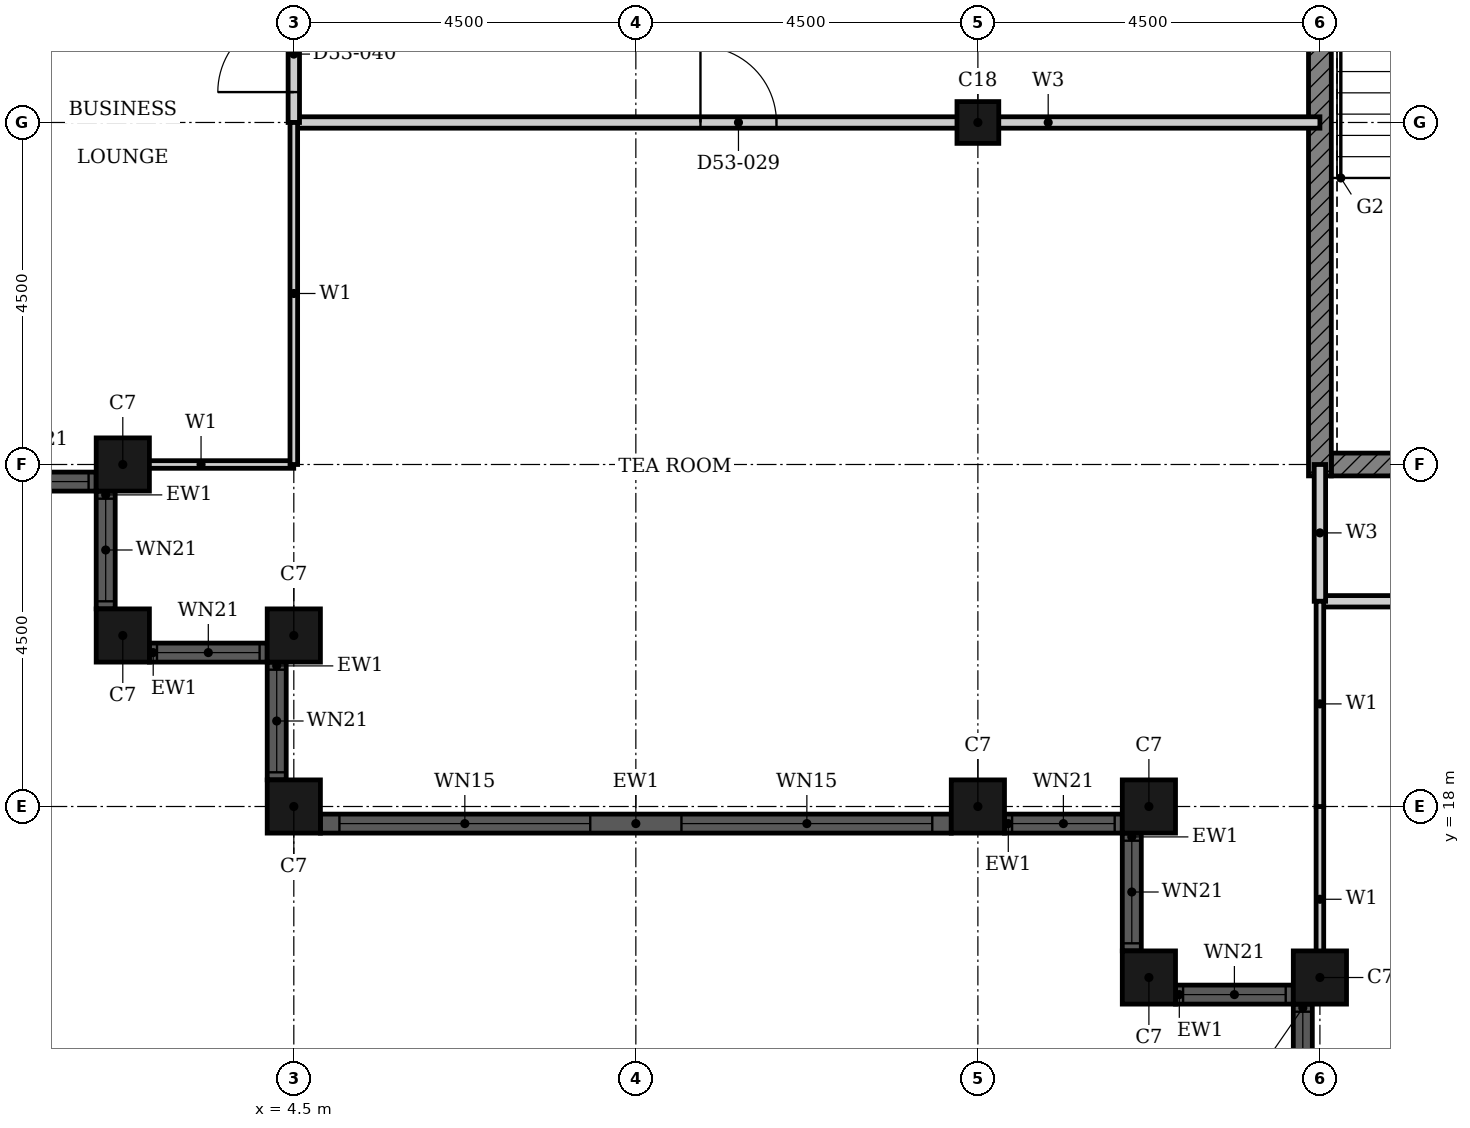
"""IFC4 building model, lengths in metres.
Left out: names, types, materials, properties, quantities, classifications, styles, units other than length and angle.
Written with IfcOpenShell. Run it as: python <this file> out.ifc"""

import sys

from ifc_helpers import new_model, si_unit, direction, frame, frame_2d, origin, origin_2d, place, context, subcontext, project, spatial, rectangle, hollow_rectangle, extrude, element, fill, save


model = new_model("IFC4")
c1 = context("Model", 3, precision=1e-05, world=origin(), true_north=direction((0.0, 1.0)))
c2 = subcontext(c1, "Body", "Model", "MODEL_VIEW")
j1 = project(units=[si_unit("LENGTHUNIT", "METRE"), si_unit("PLANEANGLEUNIT", "RADIAN")], contexts=[c1])
p1 = place(None, origin())
s1 = spatial("IfcSite", under=j1, at=p1, CompositionType="ELEMENT")
p2 = place(p1, origin())
s2 = spatial("IfcBuilding", under=s1, at=p2, CompositionType="ELEMENT")
p3 = place(p2, frame((0.0, 0.0, 210.9)))
s3 = spatial("IfcBuildingStorey", under=s2, at=p3, CompositionType="ELEMENT", Elevation=210.9)
for number, where, z_axis, x_axis in (
    (1, (2.25, 22.5, 0.0), (0.0, 0.0, 1.0), (1.0, 0.0, 0.0)),
    (2, (2.25, 20.25, 0.0), (0.0, 0.0, 1.0), (1.0, 0.0, 0.0)),
    (3, (4.5, 20.25, 0.0), (0.0, 0.0, 1.0), (1.0, 0.0, 0.0)),
    (4, (4.5, 18.0, 0.0), (0.0, 0.0, 1.0), (1.0, 0.0, 0.0)),
    (5, (13.5, 18.0, 0.0), (0.0, 0.0, 1.0), (1.0, 0.0, 0.0)),
    (6, (15.75, 18.0, 0.0), (0.0, 0.0, 1.0), (1.0, 0.0, 0.0)),
    (7, (15.75, 15.75, 0.0), (0.0, 0.0, 1.0), (1.0, 0.0, 0.0)),
    (8, (18.0, 15.75, 0.0), (0.0, 0.0, 1.0), (1.0, 0.0, 0.0)),
):
    element("IfcColumn", number, at=place(p3, frame(where, z_axis=z_axis, x_axis=x_axis)), inside=s3, PredefinedType="COLUMN", context=c2, shape_type="SweptSolid", body=[
        extrude(hollow_rectangle(XDim=0.7, YDim=0.7, WallThickness=0.022, at=origin_2d()), origin(), (0.0, 0.0, 1.0), 3.7),
    ])
p4 = place(p3, frame((13.5, 27.0, 0.0), z_axis=(0.0, 0.0, 1.0), x_axis=(1.0, 0.0, 0.0)))
e9 = element("IfcColumn", 9, at=p4, inside=s3, PredefinedType="COLUMN", context=c2, shape_type="SweptSolid", body=[
    extrude(hollow_rectangle(XDim=0.55, YDim=0.55, WallThickness=0.018, at=origin_2d()), origin(), (0.0, 0.0, 1.0), 3.7),
])
p5 = place(p3, frame((0.35, 22.275, 0.0), z_axis=(0.0, 0.0, 1.0), x_axis=(1.0, 0.0, 0.0)))
e10 = element("IfcWall", 10, at=p5, inside=s3, PredefinedType="SOLIDWALL", context=c2, shape_type="SweptSolid", body=[
    extrude(rectangle(XDim=1.55, YDim=0.25, at=frame_2d((0.775, 0.0))), origin(), (0.0, 0.0, 1.0), 3.7),
])
p6 = place(p5, frame((0.1, 0.0, 0.9)))
e11 = element("IfcOpeningElement", 11, at=p6, cuts=e10, PredefinedType="OPENING", context=c2, shape_type="SweptSolid", body=[
    extrude(rectangle(XDim=1.35, YDim=1.85, at=frame_2d((0.675, 0.925))), frame((0.0, 0.135, 0.0), z_axis=(0.0, -1.0, 0.0), x_axis=(1.0, 0.0, 0.0)), (0.0, 0.0, 1.0), 0.27),
])
p7 = place(p3, frame((2.025, 22.15, 0.0), z_axis=(0.0, 0.0, 1.0), x_axis=(0.0, -1.0, 0.0)))
e12 = element("IfcWall", 12, at=p7, inside=s3, PredefinedType="SOLIDWALL", context=c2, shape_type="SweptSolid", body=[
    extrude(rectangle(XDim=1.55, YDim=0.25, at=frame_2d((0.775, 0.0))), origin(), (0.0, 0.0, 1.0), 3.7),
])
p8 = place(p7, frame((0.1, 0.0, 0.9)))
e13 = element("IfcOpeningElement", 13, at=p8, cuts=e12, PredefinedType="OPENING", context=c2, shape_type="SweptSolid", body=[
    extrude(rectangle(XDim=1.35, YDim=1.85, at=frame_2d((0.675, 0.925))), frame((0.0, 0.135, 0.0), z_axis=(0.0, -1.0, 0.0), x_axis=(1.0, 0.0, 0.0)), (0.0, 0.0, 1.0), 0.27),
])
p9 = place(p3, frame((2.6, 20.025, 0.0), z_axis=(0.0, 0.0, 1.0), x_axis=(1.0, 0.0, 0.0)))
e14 = element("IfcWall", 14, at=p9, inside=s3, PredefinedType="SOLIDWALL", context=c2, shape_type="SweptSolid", body=[
    extrude(rectangle(XDim=1.55, YDim=0.25, at=frame_2d((0.775, 0.0))), origin(), (0.0, 0.0, 1.0), 3.7),
])
p10 = place(p9, frame((0.1, 0.0, 0.9)))
e15 = element("IfcOpeningElement", 15, at=p10, cuts=e14, PredefinedType="OPENING", context=c2, shape_type="SweptSolid", body=[
    extrude(rectangle(XDim=1.35, YDim=1.85, at=frame_2d((0.675, 0.925))), frame((0.0, 0.135, 0.0), z_axis=(0.0, -1.0, 0.0), x_axis=(1.0, 0.0, 0.0)), (0.0, 0.0, 1.0), 0.27),
])
p11 = place(p3, frame((4.275, 19.9, 0.0), z_axis=(0.0, 0.0, 1.0), x_axis=(0.0, -1.0, 0.0)))
e16 = element("IfcWall", 16, at=p11, inside=s3, PredefinedType="SOLIDWALL", context=c2, shape_type="SweptSolid", body=[
    extrude(rectangle(XDim=1.55, YDim=0.25, at=frame_2d((0.775, 0.0))), origin(), (0.0, 0.0, 1.0), 3.7),
])
p12 = place(p11, frame((0.1, 0.0, 0.9)))
e17 = element("IfcOpeningElement", 17, at=p12, cuts=e16, PredefinedType="OPENING", context=c2, shape_type="SweptSolid", body=[
    extrude(rectangle(XDim=1.35, YDim=1.85, at=frame_2d((0.675, 0.925))), frame((0.0, 0.135, 0.0), z_axis=(0.0, -1.0, 0.0), x_axis=(1.0, 0.0, 0.0)), (0.0, 0.0, 1.0), 0.27),
])
p13 = place(p3, frame((4.85, 17.775, 0.0), z_axis=(0.0, 0.0, 1.0), x_axis=(1.0, 0.0, 0.0)))
e18 = element("IfcWall", 18, at=p13, inside=s3, PredefinedType="SOLIDWALL", context=c2, shape_type="SweptSolid", body=[
    extrude(rectangle(XDim=8.3, YDim=0.25, at=frame_2d((4.15, 0.0))), origin(), (0.0, 0.0, 1.0), 3.7),
])
p14 = place(p13, frame((0.25, 0.0, 0.45)))
e19 = element("IfcOpeningElement", 19, at=p14, cuts=e18, PredefinedType="OPENING", context=c2, shape_type="SweptSolid", body=[
    extrude(rectangle(XDim=3.3, YDim=2.3, at=frame_2d((1.65, 1.15))), frame((0.0, 0.135, 0.0), z_axis=(0.0, -1.0, 0.0), x_axis=(1.0, 0.0, 0.0)), (0.0, 0.0, 1.0), 0.27),
])
p15 = place(p13, frame((4.75, 0.0, 0.45)))
e20 = element("IfcOpeningElement", 20, at=p15, cuts=e18, PredefinedType="OPENING", context=c2, shape_type="SweptSolid", body=[
    extrude(rectangle(XDim=3.3, YDim=2.3, at=frame_2d((1.65, 1.15))), frame((0.0, 0.135, 0.0), z_axis=(0.0, -1.0, 0.0), x_axis=(1.0, 0.0, 0.0)), (0.0, 0.0, 1.0), 0.27),
])
p16 = place(p3, frame((13.85, 17.775, 0.0), z_axis=(0.0, 0.0, 1.0), x_axis=(1.0, 0.0, 0.0)))
e21 = element("IfcWall", 21, at=p16, inside=s3, PredefinedType="SOLIDWALL", context=c2, shape_type="SweptSolid", body=[
    extrude(rectangle(XDim=1.55, YDim=0.25, at=frame_2d((0.775, 0.0))), origin(), (0.0, 0.0, 1.0), 3.7),
])
p17 = place(p16, frame((0.1, 0.0, 0.9)))
e22 = element("IfcOpeningElement", 22, at=p17, cuts=e21, PredefinedType="OPENING", context=c2, shape_type="SweptSolid", body=[
    extrude(rectangle(XDim=1.35, YDim=1.85, at=frame_2d((0.675, 0.925))), frame((0.0, 0.135, 0.0), z_axis=(0.0, -1.0, 0.0), x_axis=(1.0, 0.0, 0.0)), (0.0, 0.0, 1.0), 0.27),
])
p18 = place(p3, frame((15.525, 17.65, 0.0), z_axis=(0.0, 0.0, 1.0), x_axis=(0.0, -1.0, 0.0)))
e23 = element("IfcWall", 23, at=p18, inside=s3, PredefinedType="SOLIDWALL", context=c2, shape_type="SweptSolid", body=[
    extrude(rectangle(XDim=1.55, YDim=0.25, at=frame_2d((0.775, 0.0))), origin(), (0.0, 0.0, 1.0), 3.7),
])
p19 = place(p18, frame((0.1, 0.0, 0.9)))
e24 = element("IfcOpeningElement", 24, at=p19, cuts=e23, PredefinedType="OPENING", context=c2, shape_type="SweptSolid", body=[
    extrude(rectangle(XDim=1.35, YDim=1.85, at=frame_2d((0.675, 0.925))), frame((0.0, 0.135, 0.0), z_axis=(0.0, -1.0, 0.0), x_axis=(1.0, 0.0, 0.0)), (0.0, 0.0, 1.0), 0.27),
])
p20 = place(p3, frame((16.1, 15.525, 0.0), z_axis=(0.0, 0.0, 1.0), x_axis=(1.0, 0.0, 0.0)))
e25 = element("IfcWall", 25, at=p20, inside=s3, PredefinedType="SOLIDWALL", context=c2, shape_type="SweptSolid", body=[
    extrude(rectangle(XDim=1.55, YDim=0.25, at=frame_2d((0.775, 0.0))), origin(), (0.0, 0.0, 1.0), 3.7),
])
p21 = place(p20, frame((0.1, 0.0, 0.9)))
e26 = element("IfcOpeningElement", 26, at=p21, cuts=e25, PredefinedType="OPENING", context=c2, shape_type="SweptSolid", body=[
    extrude(rectangle(XDim=1.35, YDim=1.85, at=frame_2d((0.675, 0.925))), frame((0.0, 0.135, 0.0), z_axis=(0.0, -1.0, 0.0), x_axis=(1.0, 0.0, 0.0)), (0.0, 0.0, 1.0), 0.27),
])
p22 = place(p3, frame((17.775, 15.4, 0.0), z_axis=(0.0, 0.0, 1.0), x_axis=(0.0, -1.0, 0.0)))
e27 = element("IfcWall", 27, at=p22, inside=s3, PredefinedType="SOLIDWALL", context=c2, shape_type="SweptSolid", body=[
    extrude(rectangle(XDim=1.55, YDim=0.25, at=frame_2d((0.775, 0.0))), origin(), (0.0, 0.0, 1.0), 3.7),
])
p23 = place(p22, frame((0.1, 0.0, 0.9)))
e28 = element("IfcOpeningElement", 28, at=p23, cuts=e27, PredefinedType="OPENING", context=c2, shape_type="SweptSolid", body=[
    extrude(rectangle(XDim=1.35, YDim=1.85, at=frame_2d((0.675, 0.925))), frame((0.0, 0.135, 0.0), z_axis=(0.0, -1.0, 0.0), x_axis=(1.0, 0.0, 0.0)), (0.0, 0.0, 1.0), 0.27),
])
p24 = place(p3, frame((18.15, 22.5, 0.0), z_axis=(0.0, 0.0, 1.0), x_axis=(1.0, 0.0, 0.0)))
e29 = element("IfcWall", 29, at=p24, inside=s3, PredefinedType="SHEAR", context=c2, shape_type="SweptSolid", body=[
    extrude(rectangle(XDim=4.225, YDim=0.3, at=frame_2d((2.113, 0.0))), origin(), (0.0, 0.0, 1.0), 3.4),
])
p25 = place(p3, frame((18.0, 22.35, 0.0), z_axis=(0.0, 0.0, 1.0), x_axis=(0.0, 1.0, 0.0)))
e30 = element("IfcWall", 30, at=p25, inside=s3, PredefinedType="SHEAR", context=c2, shape_type="SweptSolid", body=[
    extrude(rectangle(XDim=9.3, YDim=0.3, at=frame_2d((4.65, 0.0))), origin(), (0.0, 0.0, 1.0), 3.4),
])
p26 = place(p3, frame((18.0, 20.7, 0.0), z_axis=(0.0, 0.0, 1.0), x_axis=(1.0, 0.0, 0.0)))
e31 = element("IfcWall", 31, at=p26, inside=s3, PredefinedType="PARTITIONING", context=c2, shape_type="SweptSolid", body=[
    extrude(rectangle(XDim=13.5, YDim=0.15, at=frame_2d((6.75, 0.0))), origin(), (0.0, 0.0, 1.0), 3.4),
])
p27 = place(p26, frame((6.25, 0.0, 0.0)))
e32 = element("IfcOpeningElement", 32, at=p27, cuts=e31, PredefinedType="OPENING", context=c2, shape_type="SweptSolid", body=[
    extrude(rectangle(XDim=1.0, YDim=2.1, at=frame_2d((0.5, 1.05))), frame((0.0, 0.085, 0.0), z_axis=(0.0, -1.0, 0.0), x_axis=(1.0, 0.0, 0.0)), (0.0, 0.0, 1.0), 0.17),
])
p28 = place(p3, frame((4.5, 27.0, 0.0), z_axis=(0.0, 0.0, 1.0), x_axis=(1.0, 0.0, 0.0)))
e33 = element("IfcWall", 33, at=p28, inside=s3, PredefinedType="PARTITIONING", context=c2, shape_type="SweptSolid", body=[
    extrude(rectangle(XDim=13.5, YDim=0.15, at=frame_2d((6.75, 0.0))), origin(), (0.0, 0.0, 1.0), 2.68),
])
p29 = place(p28, frame((5.35, 0.0, 0.0)))
e34 = element("IfcOpeningElement", 34, at=p29, cuts=e33, PredefinedType="OPENING", context=c2, shape_type="SweptSolid", body=[
    extrude(rectangle(XDim=1.0, YDim=2.1, at=frame_2d((0.5, 1.05))), frame((0.0, 0.085, 0.0), z_axis=(0.0, -1.0, 0.0), x_axis=(1.0, 0.0, 0.0)), (0.0, 0.0, 1.0), 0.17),
])
p30 = place(p3, frame((18.0, 20.7, 0.0), z_axis=(0.0, 0.0, 1.0), x_axis=(0.0, 1.0, 0.0)))
e35 = element("IfcWall", 35, at=p30, inside=s3, PredefinedType="PARTITIONING", context=c2, shape_type="SweptSolid", body=[
    extrude(rectangle(XDim=1.8, YDim=0.15, at=frame_2d((0.9, 0.0))), origin(), (0.0, 0.0, 1.0), 3.4),
])
p31 = place(p3, frame((4.5, 27.0, 0.0), z_axis=(0.0, 0.0, 1.0), x_axis=(0.0, 1.0, 0.0)))
e36 = element("IfcWall", 36, at=p31, inside=s3, PredefinedType="PARTITIONING", context=c2, shape_type="SweptSolid", body=[
    extrude(rectangle(XDim=1.8, YDim=0.15, at=frame_2d((0.9, 0.0))), origin(), (0.0, 0.0, 1.0), 3.4),
])
p32 = place(p31, frame((0.4, 0.0, 0.0)))
e37 = element("IfcOpeningElement", 37, at=p32, cuts=e36, PredefinedType="OPENING", context=c2, shape_type="SweptSolid", body=[
    extrude(rectangle(XDim=1.0, YDim=2.1, at=frame_2d((0.5, 1.05))), frame((0.0, 0.085, 0.0), z_axis=(0.0, -1.0, 0.0), x_axis=(1.0, 0.0, 0.0)), (0.0, 0.0, 1.0), 0.17),
])
p33 = place(p3, frame((2.06, 22.5, 0.0), z_axis=(0.0, 0.0, 1.0), x_axis=(1.0, 0.0, 0.0)))
e38 = element("IfcWall", 38, at=p33, inside=s3, PredefinedType="PARTITIONING", context=c2, shape_type="SweptSolid", body=[
    extrude(rectangle(XDim=2.439, YDim=0.1, at=frame_2d((1.219, 0.0))), origin(), (0.0, 0.0, 1.0), 2.68),
])
p34 = place(p3, frame((18.0, 15.56, 0.0), z_axis=(0.0, 0.0, 1.0), x_axis=(0.0, 1.0, 0.0)))
e39 = element("IfcWall", 39, at=p34, inside=s3, PredefinedType="PARTITIONING", context=c2, shape_type="SweptSolid", body=[
    extrude(rectangle(XDim=2.439, YDim=0.1, at=frame_2d((1.219, 0.0))), origin(), (0.0, 0.0, 1.0), 3.4),
])
p35 = place(p3, frame((18.0, 18.0, 0.0), z_axis=(0.0, 0.0, 1.0), x_axis=(0.0, 1.0, 0.0)))
e40 = element("IfcWall", 40, at=p35, inside=s3, PredefinedType="PARTITIONING", context=c2, shape_type="SweptSolid", body=[
    extrude(rectangle(XDim=2.7, YDim=0.1, at=frame_2d((1.35, 0.0))), origin(), (0.0, 0.0, 1.0), 3.4),
])
p36 = place(p3, frame((4.5, 22.5, 0.0), z_axis=(0.0, 0.0, 1.0), x_axis=(0.0, 1.0, 0.0)))
e41 = element("IfcWall", 41, at=p36, inside=s3, PredefinedType="PARTITIONING", context=c2, shape_type="SweptSolid", body=[
    extrude(rectangle(XDim=4.5, YDim=0.1, at=frame_2d((2.25, 0.0))), origin(), (0.0, 0.0, 1.0), 3.4),
])
p37 = place(p6, origin())
e42 = element("IfcWindow", 42, at=p37, inside=s3, PartitioningType="SINGLE_PANEL", PredefinedType="WINDOW", context=c2, shape_type="SweptSolid", body=[
    extrude(rectangle(XDim=1.35, YDim=1.85, at=frame_2d((0.675, 0.925))), frame((0.0, 0.03, 0.0), z_axis=(0.0, -1.0, 0.0), x_axis=(1.0, 0.0, 0.0)), (0.0, 0.0, 1.0), 0.06),
])
fill(e11, e42)
p38 = place(p8, origin())
e43 = element("IfcWindow", 43, at=p38, inside=s3, PartitioningType="SINGLE_PANEL", PredefinedType="WINDOW", context=c2, shape_type="SweptSolid", body=[
    extrude(rectangle(XDim=1.35, YDim=1.85, at=frame_2d((0.675, 0.925))), frame((0.0, 0.03, 0.0), z_axis=(0.0, -1.0, 0.0), x_axis=(1.0, 0.0, 0.0)), (0.0, 0.0, 1.0), 0.06),
])
fill(e13, e43)
p39 = place(p10, origin())
e44 = element("IfcWindow", 44, at=p39, inside=s3, PartitioningType="SINGLE_PANEL", PredefinedType="WINDOW", context=c2, shape_type="SweptSolid", body=[
    extrude(rectangle(XDim=1.35, YDim=1.85, at=frame_2d((0.675, 0.925))), frame((0.0, 0.03, 0.0), z_axis=(0.0, -1.0, 0.0), x_axis=(1.0, 0.0, 0.0)), (0.0, 0.0, 1.0), 0.06),
])
fill(e15, e44)
p40 = place(p12, origin())
e45 = element("IfcWindow", 45, at=p40, inside=s3, PartitioningType="SINGLE_PANEL", PredefinedType="WINDOW", context=c2, shape_type="SweptSolid", body=[
    extrude(rectangle(XDim=1.35, YDim=1.85, at=frame_2d((0.675, 0.925))), frame((0.0, 0.03, 0.0), z_axis=(0.0, -1.0, 0.0), x_axis=(1.0, 0.0, 0.0)), (0.0, 0.0, 1.0), 0.06),
])
fill(e17, e45)
p41 = place(p14, origin())
e46 = element("IfcWindow", 46, at=p41, inside=s3, PartitioningType="SINGLE_PANEL", PredefinedType="WINDOW", context=c2, shape_type="SweptSolid", body=[
    extrude(rectangle(XDim=3.3, YDim=2.3, at=frame_2d((1.65, 1.15))), frame((0.0, 0.03, 0.0), z_axis=(0.0, -1.0, 0.0), x_axis=(1.0, 0.0, 0.0)), (0.0, 0.0, 1.0), 0.06),
])
fill(e19, e46)
p42 = place(p15, origin())
e47 = element("IfcWindow", 47, at=p42, inside=s3, PartitioningType="SINGLE_PANEL", PredefinedType="WINDOW", context=c2, shape_type="SweptSolid", body=[
    extrude(rectangle(XDim=3.3, YDim=2.3, at=frame_2d((1.65, 1.15))), frame((0.0, 0.03, 0.0), z_axis=(0.0, -1.0, 0.0), x_axis=(1.0, 0.0, 0.0)), (0.0, 0.0, 1.0), 0.06),
])
fill(e20, e47)
p43 = place(p17, origin())
e48 = element("IfcWindow", 48, at=p43, inside=s3, PartitioningType="SINGLE_PANEL", PredefinedType="WINDOW", context=c2, shape_type="SweptSolid", body=[
    extrude(rectangle(XDim=1.35, YDim=1.85, at=frame_2d((0.675, 0.925))), frame((0.0, 0.03, 0.0), z_axis=(0.0, -1.0, 0.0), x_axis=(1.0, 0.0, 0.0)), (0.0, 0.0, 1.0), 0.06),
])
fill(e22, e48)
p44 = place(p19, origin())
e49 = element("IfcWindow", 49, at=p44, inside=s3, PartitioningType="SINGLE_PANEL", PredefinedType="WINDOW", context=c2, shape_type="SweptSolid", body=[
    extrude(rectangle(XDim=1.35, YDim=1.85, at=frame_2d((0.675, 0.925))), frame((0.0, 0.03, 0.0), z_axis=(0.0, -1.0, 0.0), x_axis=(1.0, 0.0, 0.0)), (0.0, 0.0, 1.0), 0.06),
])
fill(e24, e49)
p45 = place(p21, origin())
e50 = element("IfcWindow", 50, at=p45, inside=s3, PartitioningType="SINGLE_PANEL", PredefinedType="WINDOW", context=c2, shape_type="SweptSolid", body=[
    extrude(rectangle(XDim=1.35, YDim=1.85, at=frame_2d((0.675, 0.925))), frame((0.0, 0.03, 0.0), z_axis=(0.0, -1.0, 0.0), x_axis=(1.0, 0.0, 0.0)), (0.0, 0.0, 1.0), 0.06),
])
fill(e26, e50)
p46 = place(p23, origin())
e51 = element("IfcWindow", 51, at=p46, inside=s3, PartitioningType="SINGLE_PANEL", PredefinedType="WINDOW", context=c2, shape_type="SweptSolid", body=[
    extrude(rectangle(XDim=1.35, YDim=1.85, at=frame_2d((0.675, 0.925))), frame((0.0, 0.03, 0.0), z_axis=(0.0, -1.0, 0.0), x_axis=(1.0, 0.0, 0.0)), (0.0, 0.0, 1.0), 0.06),
])
fill(e28, e51)
p47 = place(p29, origin())
e52 = element("IfcDoor", 52, at=p47, inside=s3, OperationType="SINGLE_SWING_LEFT", PredefinedType="DOOR", context=c2, shape_type="SweptSolid", body=[
    extrude(rectangle(XDim=1.0, YDim=2.1, at=frame_2d((0.5, 1.05))), frame((0.0, 0.025, 0.0), z_axis=(0.0, -1.0, 0.0), x_axis=(1.0, 0.0, 0.0)), (0.0, 0.0, 1.0), 0.05),
])
fill(e34, e52)
p48 = place(p32, origin())
e53 = element("IfcDoor", 53, at=p48, inside=s3, OperationType="SINGLE_SWING_LEFT", PredefinedType="DOOR", context=c2, shape_type="SweptSolid", body=[
    extrude(rectangle(XDim=1.0, YDim=2.1, at=frame_2d((0.5, 1.05))), frame((0.0, 0.025, 0.0), z_axis=(0.0, -1.0, 0.0), x_axis=(1.0, 0.0, 0.0)), (0.0, 0.0, 1.0), 0.05),
])
fill(e37, e53)
save(model, sys.argv[1])
